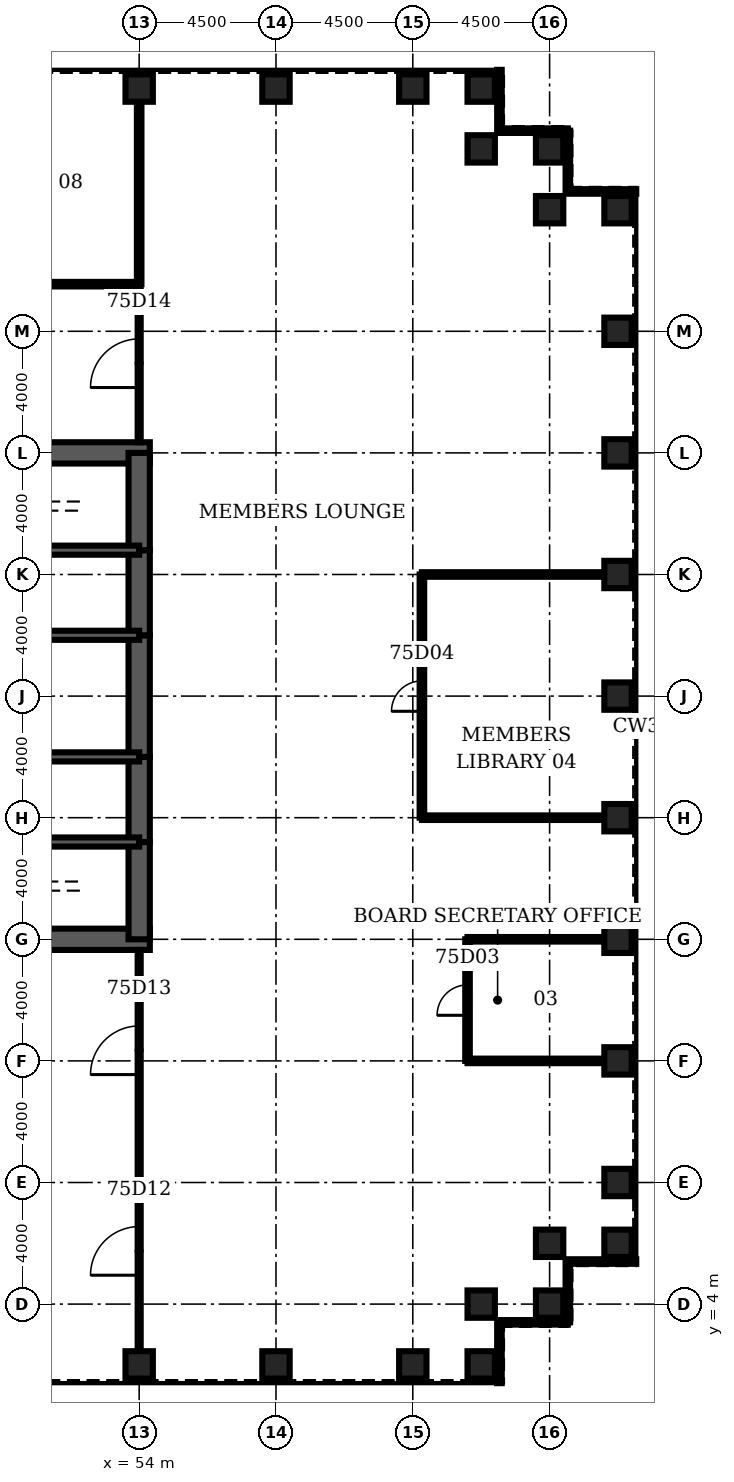
"""IFC4 building model, lengths in metres.
Left out: names, types, materials, properties, quantities, classifications, styles, units other than length and angle.
Written with IfcOpenShell. Run it as: python <this file> out.ifc"""

import sys

from ifc_helpers import new_model, si_unit, direction, frame, frame_2d, origin, origin_2d, place, context, subcontext, project, spatial, rectangle, hollow_rectangle, extrude, element, fill, save


model = new_model("IFC4")
c1 = context("Model", 3, precision=1e-05, world=origin(), true_north=direction((0.0, 1.0)))
c2 = subcontext(c1, "Body", "Model", "MODEL_VIEW")
j1 = project(units=[si_unit("LENGTHUNIT", "METRE"), si_unit("PLANEANGLEUNIT", "RADIAN")], contexts=[c1])
p1 = place(None, origin())
s1 = spatial("IfcSite", under=j1, at=p1, CompositionType="ELEMENT")
p2 = place(p1, origin())
s2 = spatial("IfcBuilding", under=s1, at=p2, CompositionType="ELEMENT")
p3 = place(p2, frame((0.0, 0.0, 329.9)))
s3 = spatial("IfcBuildingStorey", under=s2, at=p3, CompositionType="ELEMENT", Elevation=329.9)
for number, where, z_axis, x_axis in (
    (1, (54.0, 2.0, 0.0), (0.0, 0.0, 1.0), (0.0, 1.0, 0.0)),
    (2, (58.5, 2.0, 0.0), (0.0, 0.0, 1.0), (0.0, 1.0, 0.0)),
    (3, (63.0, 2.0, 0.0), (0.0, 0.0, 1.0), (0.0, 1.0, 0.0)),
    (4, (65.25, 2.0, 0.0), (0.0, 0.0, 1.0), (0.0, 1.0, 0.0)),
    (5, (65.25, 4.0, 0.0), (0.0, 0.0, 1.0), (0.0, 1.0, 0.0)),
    (6, (67.5, 4.0, 0.0), (0.0, 0.0, 1.0), (1.0, 0.0, 0.0)),
    (7, (67.5, 6.0, 0.0), (0.0, 0.0, 1.0), (1.0, 0.0, 0.0)),
    (8, (69.75, 6.0, 0.0), (0.0, 0.0, 1.0), (1.0, 0.0, 0.0)),
    (9, (69.75, 8.0, 0.0), (0.0, 0.0, 1.0), (1.0, 0.0, 0.0)),
    (10, (69.75, 12.0, 0.0), (0.0, 0.0, 1.0), (1.0, 0.0, 0.0)),
    (11, (69.75, 16.0, 0.0), (0.0, 0.0, 1.0), (1.0, 0.0, 0.0)),
    (12, (69.75, 20.0, 0.0), (0.0, 0.0, 1.0), (1.0, 0.0, 0.0)),
    (13, (69.75, 24.0, 0.0), (0.0, 0.0, 1.0), (1.0, 0.0, 0.0)),
    (14, (69.75, 28.0, 0.0), (0.0, 0.0, 1.0), (1.0, 0.0, 0.0)),
    (15, (69.75, 32.0, 0.0), (0.0, 0.0, 1.0), (1.0, 0.0, 0.0)),
    (16, (69.75, 36.0, 0.0), (0.0, 0.0, 1.0), (1.0, 0.0, 0.0)),
    (17, (69.75, 40.0, 0.0), (0.0, 0.0, 1.0), (1.0, 0.0, 0.0)),
    (18, (67.5, 40.0, 0.0), (0.0, 0.0, 1.0), (1.0, 0.0, 0.0)),
    (19, (67.5, 42.0, 0.0), (0.0, 0.0, 1.0), (1.0, 0.0, 0.0)),
    (20, (65.25, 42.0, 0.0), (0.0, 0.0, 1.0), (0.0, 1.0, 0.0)),
    (21, (65.25, 44.0, 0.0), (0.0, 0.0, 1.0), (0.0, 1.0, 0.0)),
    (22, (63.0, 44.0, 0.0), (0.0, 0.0, 1.0), (0.0, 1.0, 0.0)),
    (23, (58.5, 44.0, 0.0), (0.0, 0.0, 1.0), (0.0, 1.0, 0.0)),
    (24, (54.0, 44.0, 0.0), (0.0, 0.0, 1.0), (0.0, 1.0, 0.0)),
):
    element("IfcColumn", number, at=place(p3, frame(where, z_axis=z_axis, x_axis=x_axis)), inside=s3, PredefinedType="COLUMN", context=c2, shape_type="SweptSolid", body=[
        extrude(hollow_rectangle(XDim=0.9, YDim=0.9, WallThickness=0.05, at=origin_2d()), origin(), (0.0, 0.0, 1.0), 4.2),
    ])
for number, where, z_axis, x_axis in (
    (25, (45.0, 16.0, 0.0), (0.0, 0.0, 1.0), (1.0, 0.0, 0.0)),
    (26, (54.35, 32.0, 0.0), (0.0, 0.0, 1.0), (-1.0, 0.0, 0.0)),
):
    element("IfcWall", number, at=place(p3, frame(where, z_axis=z_axis, x_axis=x_axis)), inside=s3, PredefinedType="SHEAR", context=c2, shape_type="SweptSolid", body=[
        extrude(rectangle(XDim=9.35, YDim=0.7, at=frame_2d((4.675, 0.0))), origin(), (0.0, 0.0, 1.0), 4.2),
    ])
p4 = place(p3, frame((54.0, 16.0, 0.0), z_axis=(0.0, 0.0, 1.0), x_axis=(0.0, 1.0, 0.0)))
e27 = element("IfcWall", 27, at=p4, inside=s3, PredefinedType="SHEAR", context=c2, shape_type="SweptSolid", body=[
    extrude(rectangle(XDim=3.2, YDim=0.7, at=frame_2d((1.6, 0.0))), origin(), (0.0, 0.0, 1.0), 4.2),
])
p5 = place(p3, frame((54.0, 19.2, 0.0), z_axis=(0.0, 0.0, 1.0), x_axis=(0.0, 1.0, 0.0)))
e28 = element("IfcWall", 28, at=p5, inside=s3, PredefinedType="SHEAR", context=c2, shape_type="SweptSolid", body=[
    extrude(rectangle(XDim=2.8, YDim=0.7, at=frame_2d((1.4, 0.0))), origin(), (0.0, 0.0, 1.0), 4.2),
])
p6 = place(p5, frame((0.4, 0.0, 0.0)))
e29 = element("IfcOpeningElement", 29, at=p6, cuts=e28, PredefinedType="OPENING", context=c2, shape_type="SweptSolid", body=[
    extrude(rectangle(XDim=1.8, YDim=2.1, at=frame_2d((0.9, 1.05))), frame((0.0, 0.36, 0.0), z_axis=(0.0, -1.0, 0.0), x_axis=(1.0, 0.0, 0.0)), (0.0, 0.0, 1.0), 0.72),
])
p7 = place(p3, frame((54.0, 22.0, 0.0), z_axis=(0.0, 0.0, 1.0), x_axis=(0.0, 1.0, 0.0)))
e30 = element("IfcWall", 30, at=p7, inside=s3, PredefinedType="SHEAR", context=c2, shape_type="SweptSolid", body=[
    extrude(rectangle(XDim=4.0, YDim=0.7, at=frame_2d((2.0, 0.0))), origin(), (0.0, 0.0, 1.0), 4.2),
])
p8 = place(p3, frame((54.0, 26.0, 0.0), z_axis=(0.0, 0.0, 1.0), x_axis=(0.0, 1.0, 0.0)))
e31 = element("IfcWall", 31, at=p8, inside=s3, PredefinedType="SHEAR", context=c2, shape_type="SweptSolid", body=[
    extrude(rectangle(XDim=2.8, YDim=0.7, at=frame_2d((1.4, 0.0))), origin(), (0.0, 0.0, 1.0), 4.2),
])
p9 = place(p8, frame((0.6, 0.0, 0.0)))
e32 = element("IfcOpeningElement", 32, at=p9, cuts=e31, PredefinedType="OPENING", context=c2, shape_type="SweptSolid", body=[
    extrude(rectangle(XDim=1.8, YDim=2.1, at=frame_2d((0.9, 1.05))), frame((0.0, 0.36, 0.0), z_axis=(0.0, -1.0, 0.0), x_axis=(1.0, 0.0, 0.0)), (0.0, 0.0, 1.0), 0.72),
])
p10 = place(p3, frame((54.0, 28.8, 0.0), z_axis=(0.0, 0.0, 1.0), x_axis=(0.0, 1.0, 0.0)))
e33 = element("IfcWall", 33, at=p10, inside=s3, PredefinedType="SHEAR", context=c2, shape_type="SweptSolid", body=[
    extrude(rectangle(XDim=3.2, YDim=0.7, at=frame_2d((1.6, 0.0))), origin(), (0.0, 0.0, 1.0), 4.2),
])
p11 = place(p3, frame((45.0, 19.2, 0.0), z_axis=(0.0, 0.0, 1.0), x_axis=(1.0, 0.0, 0.0)))
e34 = element("IfcWall", 34, at=p11, inside=s3, PredefinedType="SOLIDWALL", context=c2, shape_type="SweptSolid", body=[
    extrude(rectangle(XDim=9.0, YDim=0.3, at=frame_2d((4.5, 0.0))), origin(), (0.0, 0.0, 1.0), 4.2),
])
p12 = place(p11, frame((7.35, 0.0, 0.0)))
e35 = element("IfcOpeningElement", 35, at=p12, cuts=e34, PredefinedType="OPENING", context=c2, shape_type="SweptSolid", body=[
    extrude(rectangle(XDim=1.0, YDim=2.1, at=frame_2d((0.5, 1.05))), frame((0.0, 0.16, 0.0), z_axis=(0.0, -1.0, 0.0), x_axis=(1.0, 0.0, 0.0)), (0.0, 0.0, 1.0), 0.32),
])
p13 = place(p3, frame((45.0, 28.8, 0.0), z_axis=(0.0, 0.0, 1.0), x_axis=(1.0, 0.0, 0.0)))
e36 = element("IfcWall", 36, at=p13, inside=s3, PredefinedType="SOLIDWALL", context=c2, shape_type="SweptSolid", body=[
    extrude(rectangle(XDim=9.0, YDim=0.3, at=frame_2d((4.5, 0.0))), origin(), (0.0, 0.0, 1.0), 4.2),
])
p14 = place(p13, frame((7.35, 0.0, 0.0)))
e37 = element("IfcOpeningElement", 37, at=p14, cuts=e36, PredefinedType="OPENING", context=c2, shape_type="SweptSolid", body=[
    extrude(rectangle(XDim=1.0, YDim=2.1, at=frame_2d((0.5, 1.05))), frame((0.0, 0.16, 0.0), z_axis=(0.0, -1.0, 0.0), x_axis=(1.0, 0.0, 0.0)), (0.0, 0.0, 1.0), 0.32),
])
p15 = place(p3, frame((48.0, 22.0, 0.0), z_axis=(0.0, 0.0, 1.0), x_axis=(1.0, 0.0, 0.0)))
e38 = element("IfcWall", 38, at=p15, inside=s3, PredefinedType="SOLIDWALL", context=c2, shape_type="SweptSolid", body=[
    extrude(rectangle(XDim=6.0, YDim=0.3, at=frame_2d((3.0, 0.0))), origin(), (0.0, 0.0, 1.0), 4.2),
])
p16 = place(p15, frame((2.0, 0.0, 0.0)))
e39 = element("IfcOpeningElement", 39, at=p16, cuts=e38, PredefinedType="OPENING", context=c2, shape_type="SweptSolid", body=[
    extrude(rectangle(XDim=1.0, YDim=2.1, at=frame_2d((0.5, 1.05))), frame((0.0, 0.16, 0.0), z_axis=(0.0, -1.0, 0.0), x_axis=(1.0, 0.0, 0.0)), (0.0, 0.0, 1.0), 0.32),
])
p17 = place(p15, frame((4.4, 0.0, 0.0)))
e40 = element("IfcOpeningElement", 40, at=p17, cuts=e38, PredefinedType="OPENING", context=c2, shape_type="SweptSolid", body=[
    extrude(rectangle(XDim=1.0, YDim=2.1, at=frame_2d((0.5, 1.05))), frame((0.0, 0.16, 0.0), z_axis=(0.0, -1.0, 0.0), x_axis=(1.0, 0.0, 0.0)), (0.0, 0.0, 1.0), 0.32),
])
p18 = place(p3, frame((48.0, 26.0, 0.0), z_axis=(0.0, 0.0, 1.0), x_axis=(1.0, 0.0, 0.0)))
e41 = element("IfcWall", 41, at=p18, inside=s3, PredefinedType="SOLIDWALL", context=c2, shape_type="SweptSolid", body=[
    extrude(rectangle(XDim=6.0, YDim=0.3, at=frame_2d((3.0, 0.0))), origin(), (0.0, 0.0, 1.0), 4.2),
])
p19 = place(p3, frame((52.075, 22.15, 0.0), z_axis=(0.0, 0.0, 1.0), x_axis=(0.0, 1.0, 0.0)))
e42 = element("IfcWall", 42, at=p19, inside=s3, PredefinedType="PARTITIONING", context=c2, shape_type="SweptSolid", body=[
    extrude(rectangle(XDim=3.7, YDim=0.15, at=frame_2d((1.85, 0.0))), origin(), (0.0, 0.0, 1.0), 3.0),
])
p20 = place(p3, frame((64.8, 12.0, 0.0), z_axis=(0.0, 0.0, 1.0), x_axis=(1.0, 0.0, 0.0)))
e43 = element("IfcWall", 43, at=p20, inside=s3, PredefinedType="PARTITIONING", context=c2, shape_type="SweptSolid", body=[
    extrude(rectangle(XDim=4.5, YDim=0.15, at=frame_2d((2.25, 0.0))), origin(), (0.0, 0.0, 1.0), 3.0),
])
p21 = place(p3, frame((64.8, 16.0, 0.0), z_axis=(0.0, 0.0, 1.0), x_axis=(1.0, 0.0, 0.0)))
e44 = element("IfcWall", 44, at=p21, inside=s3, PredefinedType="PARTITIONING", context=c2, shape_type="SweptSolid", body=[
    extrude(rectangle(XDim=4.5, YDim=0.15, at=frame_2d((2.25, 0.0))), origin(), (0.0, 0.0, 1.0), 2.942),
])
for number, where, z_axis, x_axis in (
    (45, (63.3, 20.0, 0.0), (0.0, 0.0, 1.0), (1.0, 0.0, 0.0)),
    (46, (63.3, 28.0, 0.0), (0.0, 0.0, 1.0), (1.0, 0.0, 0.0)),
):
    element("IfcWall", number, at=place(p3, frame(where, z_axis=z_axis, x_axis=x_axis)), inside=s3, PredefinedType="PARTITIONING", context=c2, shape_type="SweptSolid", body=[
        extrude(rectangle(XDim=6.0, YDim=0.15, at=frame_2d((3.0, 0.0))), origin(), (0.0, 0.0, 1.0), 3.0),
    ])
p22 = place(p3, frame((45.0, 37.55, 0.0), z_axis=(0.0, 0.0, 1.0), x_axis=(1.0, 0.0, 0.0)))
e47 = element("IfcWall", 47, at=p22, inside=s3, PredefinedType="PARTITIONING", context=c2, shape_type="SweptSolid", body=[
    extrude(rectangle(XDim=9.0, YDim=0.15, at=frame_2d((4.5, 0.0))), origin(), (0.0, 0.0, 1.0), 3.0),
])
p23 = place(p22, frame((4.0, 0.0, 0.0)))
e48 = element("IfcOpeningElement", 48, at=p23, cuts=e47, PredefinedType="OPENING", context=c2, shape_type="SweptSolid", body=[
    extrude(rectangle(XDim=1.0, YDim=2.1, at=frame_2d((0.5, 1.05))), frame((0.0, 0.085, 0.0), z_axis=(0.0, -1.0, 0.0), x_axis=(1.0, 0.0, 0.0)), (0.0, 0.0, 1.0), 0.17),
])
p24 = place(p3, frame((54.0, 2.45, 0.0), z_axis=(0.0, 0.0, 1.0), x_axis=(0.0, 1.0, 0.0)))
e49 = element("IfcWall", 49, at=p24, inside=s3, PredefinedType="PARTITIONING", context=c2, shape_type="SweptSolid", body=[
    extrude(rectangle(XDim=13.2, YDim=0.1, at=frame_2d((6.6, 0.0))), origin(), (0.0, 0.0, 1.0), 3.0),
])
p25 = place(p24, frame((2.5, 0.0, 0.0)))
e50 = element("IfcOpeningElement", 50, at=p25, cuts=e49, PredefinedType="OPENING", context=c2, shape_type="SweptSolid", body=[
    extrude(rectangle(XDim=1.6, YDim=2.1, at=frame_2d((0.8, 1.05))), frame((0.0, 0.06, 0.0), z_axis=(0.0, -1.0, 0.0), x_axis=(1.0, 0.0, 0.0)), (0.0, 0.0, 1.0), 0.12),
])
p26 = place(p24, frame((9.1, 0.0, 0.0)))
e51 = element("IfcOpeningElement", 51, at=p26, cuts=e49, PredefinedType="OPENING", context=c2, shape_type="SweptSolid", body=[
    extrude(rectangle(XDim=1.6, YDim=2.1, at=frame_2d((0.8, 1.05))), frame((0.0, 0.06, 0.0), z_axis=(0.0, -1.0, 0.0), x_axis=(1.0, 0.0, 0.0)), (0.0, 0.0, 1.0), 0.12),
])
p27 = place(p3, frame((54.0, 32.35, 0.0), z_axis=(0.0, 0.0, 1.0), x_axis=(0.0, 1.0, 0.0)))
e52 = element("IfcWall", 52, at=p27, inside=s3, PredefinedType="PARTITIONING", context=c2, shape_type="SweptSolid", body=[
    extrude(rectangle(XDim=5.2, YDim=0.1, at=frame_2d((2.6, 0.0))), origin(), (0.0, 0.0, 1.0), 3.0),
])
p28 = place(p27, frame((1.8, 0.0, 0.0)))
e53 = element("IfcOpeningElement", 53, at=p28, cuts=e52, PredefinedType="OPENING", context=c2, shape_type="SweptSolid", body=[
    extrude(rectangle(XDim=1.6, YDim=2.1, at=frame_2d((0.8, 1.05))), frame((0.0, 0.06, 0.0), z_axis=(0.0, -1.0, 0.0), x_axis=(1.0, 0.0, 0.0)), (0.0, 0.0, 1.0), 0.12),
])
p29 = place(p3, frame((54.0, 37.55, 0.0), z_axis=(0.0, 0.0, 1.0), x_axis=(0.0, 1.0, 0.0)))
e54 = element("IfcWall", 54, at=p29, inside=s3, PredefinedType="PARTITIONING", context=c2, shape_type="SweptSolid", body=[
    extrude(rectangle(XDim=6.0, YDim=0.15, at=frame_2d((3.0, 0.0))), origin(), (0.0, 0.0, 1.0), 3.0),
])
p30 = place(p3, frame((63.3, 20.0, 0.0), z_axis=(0.0, 0.0, 1.0), x_axis=(0.0, 1.0, 0.0)))
e55 = element("IfcWall", 55, at=p30, inside=s3, PredefinedType="PARTITIONING", context=c2, shape_type="SweptSolid", body=[
    extrude(rectangle(XDim=8.0, YDim=0.15, at=frame_2d((4.0, 0.0))), origin(), (0.0, 0.0, 1.0), 3.0),
])
p31 = place(p30, frame((3.5, 0.0, 0.0)))
e56 = element("IfcOpeningElement", 56, at=p31, cuts=e55, PredefinedType="OPENING", context=c2, shape_type="SweptSolid", body=[
    extrude(rectangle(XDim=1.0, YDim=2.1, at=frame_2d((0.5, 1.05))), frame((0.0, 0.085, 0.0), z_axis=(0.0, -1.0, 0.0), x_axis=(1.0, 0.0, 0.0)), (0.0, 0.0, 1.0), 0.17),
])
p32 = place(p3, frame((64.8, 12.0, 0.0), z_axis=(0.0, 0.0, 1.0), x_axis=(0.0, 1.0, 0.0)))
e57 = element("IfcWall", 57, at=p32, inside=s3, PredefinedType="PARTITIONING", context=c2, shape_type="SweptSolid", body=[
    extrude(rectangle(XDim=4.0, YDim=0.15, at=frame_2d((2.0, 0.0))), origin(), (0.0, 0.0, 1.0), 3.0),
])
p33 = place(p32, frame((1.5, 0.0, 0.0)))
e58 = element("IfcOpeningElement", 58, at=p33, cuts=e57, PredefinedType="OPENING", context=c2, shape_type="SweptSolid", body=[
    extrude(rectangle(XDim=1.0, YDim=2.1, at=frame_2d((0.5, 1.05))), frame((0.0, 0.085, 0.0), z_axis=(0.0, -1.0, 0.0), x_axis=(1.0, 0.0, 0.0)), (0.0, 0.0, 1.0), 0.17),
])
p34 = place(p3, frame((65.85, 1.4, 0.0), z_axis=(0.0, 0.0, 1.0), x_axis=(0.0, 1.0, 0.0)))
e59 = element("IfcWall", 59, at=p34, inside=s3, PredefinedType="ELEMENTEDWALL", context=c2, shape_type="SweptSolid", body=[
    extrude(rectangle(XDim=2.0, YDim=0.15, at=frame_2d((1.0, 0.0))), origin(), (0.0, 0.0, 1.0), 3.95),
])
p35 = place(p3, frame((65.85, 3.4, 0.0), z_axis=(0.0, 0.0, 1.0), x_axis=(1.0, 0.0, 0.0)))
e60 = element("IfcWall", 60, at=p35, inside=s3, PredefinedType="ELEMENTEDWALL", context=c2, shape_type="SweptSolid", body=[
    extrude(rectangle(XDim=2.25, YDim=0.15, at=frame_2d((1.125, 0.0))), origin(), (0.0, 0.0, 1.0), 3.95),
])
p36 = place(p3, frame((68.1, 3.4, 0.0), z_axis=(0.0, 0.0, 1.0), x_axis=(0.0, 1.0, 0.0)))
e61 = element("IfcWall", 61, at=p36, inside=s3, PredefinedType="ELEMENTEDWALL", context=c2, shape_type="SweptSolid", body=[
    extrude(rectangle(XDim=2.0, YDim=0.15, at=frame_2d((1.0, 0.0))), origin(), (0.0, 0.0, 1.0), 3.95),
])
for number, where, z_axis, x_axis in (
    (62, (68.1, 5.4, 0.0), (0.0, 0.0, 1.0), (1.0, 0.0, 0.0)),
    (63, (70.35, 40.6, 0.0), (0.0, 0.0, 1.0), (-1.0, 0.0, 0.0)),
):
    element("IfcWall", number, at=place(p3, frame(where, z_axis=z_axis, x_axis=x_axis)), inside=s3, PredefinedType="ELEMENTEDWALL", context=c2, shape_type="SweptSolid", body=[
        extrude(rectangle(XDim=2.25, YDim=0.15, at=frame_2d((1.125, 0.0))), origin(), (0.0, 0.0, 1.0), 3.95),
    ])
p37 = place(p3, frame((68.1, 40.6, 0.0), z_axis=(0.0, 0.0, 1.0), x_axis=(0.0, 1.0, 0.0)))
e64 = element("IfcWall", 64, at=p37, inside=s3, PredefinedType="ELEMENTEDWALL", context=c2, shape_type="SweptSolid", body=[
    extrude(rectangle(XDim=2.0, YDim=0.15, at=frame_2d((1.0, 0.0))), origin(), (0.0, 0.0, 1.0), 3.95),
])
p38 = place(p3, frame((68.1, 42.6, 0.0), z_axis=(0.0, 0.0, 1.0), x_axis=(-1.0, 0.0, 0.0)))
e65 = element("IfcWall", 65, at=p38, inside=s3, PredefinedType="ELEMENTEDWALL", context=c2, shape_type="SweptSolid", body=[
    extrude(rectangle(XDim=2.25, YDim=0.15, at=frame_2d((1.125, 0.0))), origin(), (0.0, 0.0, 1.0), 3.95),
])
p39 = place(p3, frame((65.85, 42.6, 0.0), z_axis=(0.0, 0.0, 1.0), x_axis=(0.0, 1.0, 0.0)))
e66 = element("IfcWall", 66, at=p39, inside=s3, PredefinedType="ELEMENTEDWALL", context=c2, shape_type="SweptSolid", body=[
    extrude(rectangle(XDim=2.0, YDim=0.15, at=frame_2d((1.0, 0.0))), origin(), (0.0, 0.0, 1.0), 3.95),
])
p40 = place(p33, origin())
e67 = element("IfcDoor", 67, at=p40, inside=s3, OperationType="SINGLE_SWING_LEFT", PredefinedType="DOOR", context=c2, shape_type="SweptSolid", body=[
    extrude(rectangle(XDim=1.0, YDim=2.1, at=frame_2d((0.5, 1.05))), frame((0.0, 0.025, 0.0), z_axis=(0.0, -1.0, 0.0), x_axis=(1.0, 0.0, 0.0)), (0.0, 0.0, 1.0), 0.05),
])
fill(e58, e67)
p41 = place(p31, origin())
e68 = element("IfcDoor", 68, at=p41, inside=s3, OperationType="SINGLE_SWING_LEFT", PredefinedType="DOOR", context=c2, shape_type="SweptSolid", body=[
    extrude(rectangle(XDim=1.0, YDim=2.1, at=frame_2d((0.5, 1.05))), frame((0.0, 0.025, 0.0), z_axis=(0.0, -1.0, 0.0), x_axis=(1.0, 0.0, 0.0)), (0.0, 0.0, 1.0), 0.05),
])
fill(e56, e68)
p42 = place(p25, origin())
e69 = element("IfcDoor", 69, at=p42, inside=s3, OperationType="SINGLE_SWING_LEFT", PredefinedType="DOOR", context=c2, shape_type="SweptSolid", body=[
    extrude(rectangle(XDim=1.6, YDim=2.1, at=frame_2d((0.8, 1.05))), frame((0.0, 0.025, 0.0), z_axis=(0.0, -1.0, 0.0), x_axis=(1.0, 0.0, 0.0)), (0.0, 0.0, 1.0), 0.05),
])
fill(e50, e69)
p43 = place(p26, origin())
e70 = element("IfcDoor", 70, at=p43, inside=s3, OperationType="SINGLE_SWING_LEFT", PredefinedType="DOOR", context=c2, shape_type="SweptSolid", body=[
    extrude(rectangle(XDim=1.6, YDim=2.1, at=frame_2d((0.8, 1.05))), frame((0.0, 0.025, 0.0), z_axis=(0.0, -1.0, 0.0), x_axis=(1.0, 0.0, 0.0)), (0.0, 0.0, 1.0), 0.05),
])
fill(e51, e70)
p44 = place(p28, origin())
e71 = element("IfcDoor", 71, at=p44, inside=s3, OperationType="SINGLE_SWING_LEFT", PredefinedType="DOOR", context=c2, shape_type="SweptSolid", body=[
    extrude(rectangle(XDim=1.6, YDim=2.1, at=frame_2d((0.8, 1.05))), frame((0.0, 0.025, 0.0), z_axis=(0.0, -1.0, 0.0), x_axis=(1.0, 0.0, 0.0)), (0.0, 0.0, 1.0), 0.05),
])
fill(e53, e71)
p45 = place(p12, origin())
e72 = element("IfcDoor", 72, at=p45, inside=s3, OperationType="SINGLE_SWING_RIGHT", PredefinedType="DOOR", context=c2, shape_type="SweptSolid", body=[
    extrude(rectangle(XDim=1.0, YDim=2.1, at=frame_2d((0.5, 1.05))), frame((0.0, 0.025, 0.0), z_axis=(0.0, -1.0, 0.0), x_axis=(1.0, 0.0, 0.0)), (0.0, 0.0, 1.0), 0.05),
])
fill(e35, e72)
p46 = place(p14, origin())
e73 = element("IfcDoor", 73, at=p46, inside=s3, OperationType="SINGLE_SWING_RIGHT", PredefinedType="DOOR", context=c2, shape_type="SweptSolid", body=[
    extrude(rectangle(XDim=1.0, YDim=2.1, at=frame_2d((0.5, 1.05))), frame((0.0, 0.025, 0.0), z_axis=(0.0, -1.0, 0.0), x_axis=(1.0, 0.0, 0.0)), (0.0, 0.0, 1.0), 0.05),
])
fill(e37, e73)
p47 = place(p6, origin())
e74 = element("IfcDoor", 74, at=p47, inside=s3, OperationType="SINGLE_SWING_LEFT", PredefinedType="DOOR", context=c2, shape_type="SweptSolid", body=[
    extrude(rectangle(XDim=1.8, YDim=2.1, at=frame_2d((0.9, 1.05))), frame((0.0, 0.35, 0.0), z_axis=(0.0, -1.0, 0.0), x_axis=(1.0, 0.0, 0.0)), (0.0, 0.0, 1.0), 0.699),
])
fill(e29, e74)
p48 = place(p9, origin())
e75 = element("IfcDoor", 75, at=p48, inside=s3, OperationType="SINGLE_SWING_LEFT", PredefinedType="DOOR", context=c2, shape_type="SweptSolid", body=[
    extrude(rectangle(XDim=1.8, YDim=2.1, at=frame_2d((0.9, 1.05))), frame((0.0, 0.35, 0.0), z_axis=(0.0, -1.0, 0.0), x_axis=(1.0, 0.0, 0.0)), (0.0, 0.0, 1.0), 0.699),
])
fill(e32, e75)
p49 = place(p17, origin())
e76 = element("IfcDoor", 76, at=p49, inside=s3, OperationType="SINGLE_SWING_RIGHT", PredefinedType="DOOR", context=c2, shape_type="SweptSolid", body=[
    extrude(rectangle(XDim=1.0, YDim=2.1, at=frame_2d((0.5, 1.05))), frame((0.0, 0.025, 0.0), z_axis=(0.0, -1.0, 0.0), x_axis=(1.0, 0.0, 0.0)), (0.0, 0.0, 1.0), 0.05),
])
fill(e40, e76)
save(model, sys.argv[1])
